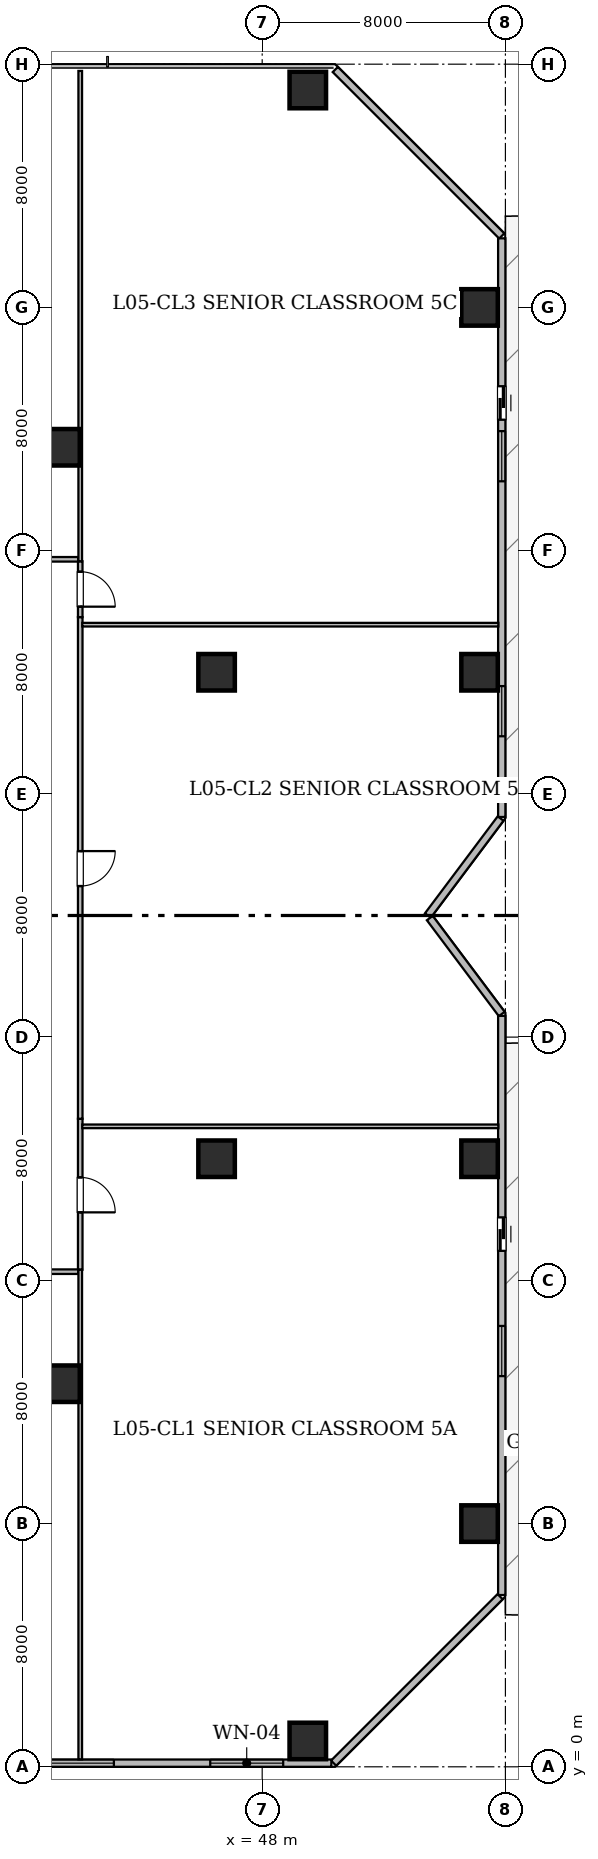
"""IFC4 building model, lengths in metres.
Left out: names, types, materials, properties, quantities, classifications, styles, units other than length and angle.
Written with IfcOpenShell. Run it as: python <this file> out.ifc"""

import sys

from ifc_helpers import new_model, si_unit, direction, frame, frame_2d, origin, origin_2d, place, context, subcontext, project, spatial, rectangle, hollow_rectangle, extrude, element, fill, save


model = new_model("IFC4")
c1 = context("Model", 3, precision=1e-05, world=origin(), true_north=direction((0.0, 1.0)))
c2 = subcontext(c1, "Body", "Model", "MODEL_VIEW")
j1 = project(units=[si_unit("LENGTHUNIT", "METRE"), si_unit("PLANEANGLEUNIT", "RADIAN")], contexts=[c1])
p1 = place(None, origin())
s1 = spatial("IfcSite", under=j1, at=p1, CompositionType="ELEMENT")
p2 = place(p1, origin())
s2 = spatial("IfcBuilding", under=s1, at=p2, CompositionType="ELEMENT")
p3 = place(p2, frame((0.0, 0.0, 24.6)))
s3 = spatial("IfcBuildingStorey", under=s2, at=p3, CompositionType="ELEMENT", Elevation=24.6)
for number, where, z_axis, x_axis in (
    (1, (49.5, 0.85, 0.0), (0.0, 0.0, 1.0), (1.0, 0.0, 0.0)),
    (2, (49.5, 55.15, 0.0), (0.0, 0.0, 1.0), (1.0, 0.0, 0.0)),
    (3, (55.15, 8.0, 0.0), (0.0, 0.0, 1.0), (1.0, 0.0, 0.0)),
    (4, (55.15, 20.0, 0.0), (0.0, 0.0, 1.0), (1.0, 0.0, 0.0)),
    (5, (55.15, 36.0, 0.0), (0.0, 0.0, 1.0), (1.0, 0.0, 0.0)),
    (6, (55.15, 48.0, 0.0), (0.0, 0.0, 1.0), (1.0, 0.0, 0.0)),
    (7, (41.4, 12.6, 0.0), (0.0, 0.0, 1.0), (1.0, 0.0, 0.0)),
    (8, (41.4, 43.4, 0.0), (0.0, 0.0, 1.0), (1.0, 0.0, 0.0)),
    (9, (46.5, 20.0, 0.0), (0.0, 0.0, 1.0), (1.0, 0.0, 0.0)),
    (10, (46.5, 36.0, 0.0), (0.0, 0.0, 1.0), (1.0, 0.0, 0.0)),
):
    element("IfcColumn", number, at=place(p3, frame(where, z_axis=z_axis, x_axis=x_axis)), inside=s3, PredefinedType="COLUMN", context=c2, shape_type="SweptSolid", body=[
        extrude(hollow_rectangle(XDim=1.2, YDim=1.2, WallThickness=0.06, at=origin_2d()), origin(), (0.0, 0.0, 1.0), 4.2),
    ])
p4 = place(p3, frame((50.405, 55.825, 0.0), z_axis=(0.0, 0.0, 1.0), x_axis=(0.707106781187, -0.707106781187, 0.0)))
e11 = element("IfcWall", 11, at=p4, inside=s3, PredefinedType="STANDARD", context=c2, shape_type="SweptSolid", body=[
    extrude(rectangle(XDim=7.743, YDim=0.24, at=frame_2d((3.871, 0.0))), origin(), (0.0, 0.0, 1.0), 3.92),
])
p5 = place(p3, frame((55.88, 50.272, 0.0), z_axis=(0.0, 0.0, 1.0), x_axis=(0.0, -1.0, 0.0)))
e12 = element("IfcWall", 12, at=p5, inside=s3, PredefinedType="STANDARD", context=c2, shape_type="SweptSolid", body=[
    extrude(rectangle(XDim=19.032, YDim=0.24, at=frame_2d((9.516, 0.0))), origin(), (0.0, 0.0, 1.0), 3.92),
])
p6 = place(p5, frame((4.865, 0.0, 0.0)))
e13 = element("IfcOpeningElement", 13, at=p6, cuts=e12, PredefinedType="OPENING", context=c2, shape_type="SweptSolid", body=[
    extrude(rectangle(XDim=1.1, YDim=2.2, at=frame_2d((0.55, 1.1))), frame((0.0, 0.13, 0.0), z_axis=(0.0, -1.0, 0.0), x_axis=(1.0, 0.0, 0.0)), (0.0, 0.0, 1.0), 0.26),
])
p7 = place(p5, frame((14.727, 0.0, 0.85)))
e14 = element("IfcOpeningElement", 14, at=p7, cuts=e12, PredefinedType="OPENING", context=c2, shape_type="SweptSolid", body=[
    extrude(rectangle(XDim=1.65, YDim=1.55, at=frame_2d((0.825, 0.775))), frame((0.0, 0.13, 0.0), z_axis=(0.0, -1.0, 0.0), x_axis=(1.0, 0.0, 0.0)), (0.0, 0.0, 1.0), 0.26),
])
p8 = place(p5, frame((6.341, 0.0, 0.85)))
e15 = element("IfcOpeningElement", 15, at=p8, cuts=e12, PredefinedType="OPENING", context=c2, shape_type="SweptSolid", body=[
    extrude(rectangle(XDim=1.65, YDim=1.55, at=frame_2d((0.825, 0.775))), frame((0.0, 0.13, 0.0), z_axis=(0.0, -1.0, 0.0), x_axis=(1.0, 0.0, 0.0)), (0.0, 0.0, 1.0), 0.26),
])
p9 = place(p3, frame((55.842, 31.189, 0.0), z_axis=(0.0, 0.0, 1.0), x_axis=(-0.600058791648, -0.799955902889, 0.0)))
e16 = element("IfcWall", 16, at=p9, inside=s3, PredefinedType="STANDARD", context=c2, shape_type="SweptSolid", body=[
    extrude(rectangle(XDim=3.986, YDim=0.24, at=frame_2d((1.993, 0.0))), origin(), (0.0, 0.0, 1.0), 3.92),
])
p10 = place(p3, frame((53.513, 27.916, 0.0), z_axis=(0.0, 0.0, 1.0), x_axis=(0.599990098106, -0.800007426325, 0.0)))
e17 = element("IfcWall", 17, at=p10, inside=s3, PredefinedType="STANDARD", context=c2, shape_type="SweptSolid", body=[
    extrude(rectangle(XDim=3.945, YDim=0.24, at=frame_2d((1.973, 0.0))), origin(), (0.0, 0.0, 1.0), 3.92),
])
p11 = place(p3, frame((55.88, 24.698, 0.0), z_axis=(0.0, 0.0, 1.0), x_axis=(0.0, -1.0, 0.0)))
e18 = element("IfcWall", 18, at=p11, inside=s3, PredefinedType="STANDARD", context=c2, shape_type="SweptSolid", body=[
    extrude(rectangle(XDim=19.048, YDim=0.24, at=frame_2d((9.524, 0.0))), origin(), (0.0, 0.0, 1.0), 3.92),
])
p12 = place(p11, frame((6.628, 0.0, 0.0)))
e19 = element("IfcOpeningElement", 19, at=p12, cuts=e18, PredefinedType="OPENING", context=c2, shape_type="SweptSolid", body=[
    extrude(rectangle(XDim=1.1, YDim=2.2, at=frame_2d((0.55, 1.1))), frame((0.0, 0.13, 0.0), z_axis=(0.0, -1.0, 0.0), x_axis=(1.0, 0.0, 0.0)), (0.0, 0.0, 1.0), 0.26),
])
p13 = place(p11, frame((10.198, 0.0, 0.85)))
e20 = element("IfcOpeningElement", 20, at=p13, cuts=e18, PredefinedType="OPENING", context=c2, shape_type="SweptSolid", body=[
    extrude(rectangle(XDim=1.65, YDim=1.55, at=frame_2d((0.825, 0.775))), frame((0.0, 0.13, 0.0), z_axis=(0.0, -1.0, 0.0), x_axis=(1.0, 0.0, 0.0)), (0.0, 0.0, 1.0), 0.26),
])
p14 = place(p3, frame((55.826, 5.596, 0.0), z_axis=(0.0, 0.0, 1.0), x_axis=(-0.707106781187, -0.707106781187, 0.0)))
e21 = element("IfcWall", 21, at=p14, inside=s3, PredefinedType="STANDARD", context=c2, shape_type="SweptSolid", body=[
    extrude(rectangle(XDim=7.744, YDim=0.24, at=frame_2d((3.872, 0.0))), origin(), (0.0, 0.0, 1.0), 3.92),
])
p15 = place(p3, frame((50.275, 0.12, 0.0), z_axis=(0.0, 0.0, 1.0), x_axis=(-1.0, 0.0, 0.0)))
e22 = element("IfcWall", 22, at=p15, inside=s3, PredefinedType="STANDARD", context=c2, shape_type="SweptSolid", body=[
    extrude(rectangle(XDim=44.55, YDim=0.24, at=frame_2d((22.275, 0.0))), origin(), (0.0, 0.0, 1.0), 3.92),
])
p16 = place(p15, frame((1.584, 0.0, 0.9)))
e23 = element("IfcOpeningElement", 23, at=p16, cuts=e22, PredefinedType="OPENING", context=c2, shape_type="SweptSolid", body=[
    extrude(rectangle(XDim=2.4, YDim=1.7, at=frame_2d((1.2, 0.85))), frame((0.0, 0.13, 0.0), z_axis=(0.0, -1.0, 0.0), x_axis=(1.0, 0.0, 0.0)), (0.0, 0.0, 1.0), 0.26),
])
p17 = place(p15, frame((7.153, 0.0, 0.9)))
e24 = element("IfcOpeningElement", 24, at=p17, cuts=e22, PredefinedType="OPENING", context=c2, shape_type="SweptSolid", body=[
    extrude(rectangle(XDim=2.4, YDim=1.7, at=frame_2d((1.2, 0.85))), frame((0.0, 0.13, 0.0), z_axis=(0.0, -1.0, 0.0), x_axis=(1.0, 0.0, 0.0)), (0.0, 0.0, 1.0), 0.26),
])
p18 = place(p15, frame((12.722, 0.0, 0.9)))
e25 = element("IfcOpeningElement", 25, at=p18, cuts=e22, PredefinedType="OPENING", context=c2, shape_type="SweptSolid", body=[
    extrude(rectangle(XDim=2.4, YDim=1.7, at=frame_2d((1.2, 0.85))), frame((0.0, 0.13, 0.0), z_axis=(0.0, -1.0, 0.0), x_axis=(1.0, 0.0, 0.0)), (0.0, 0.0, 1.0), 0.26),
])
p19 = place(p15, frame((18.291, 0.0, 0.9)))
e26 = element("IfcOpeningElement", 26, at=p19, cuts=e22, PredefinedType="OPENING", context=c2, shape_type="SweptSolid", body=[
    extrude(rectangle(XDim=2.4, YDim=1.7, at=frame_2d((1.2, 0.85))), frame((0.0, 0.13, 0.0), z_axis=(0.0, -1.0, 0.0), x_axis=(1.0, 0.0, 0.0)), (0.0, 0.0, 1.0), 0.26),
])
p20 = place(p15, frame((23.859, 0.0, 0.9)))
e27 = element("IfcOpeningElement", 27, at=p20, cuts=e22, PredefinedType="OPENING", context=c2, shape_type="SweptSolid", body=[
    extrude(rectangle(XDim=2.4, YDim=1.7, at=frame_2d((1.2, 0.85))), frame((0.0, 0.13, 0.0), z_axis=(0.0, -1.0, 0.0), x_axis=(1.0, 0.0, 0.0)), (0.0, 0.0, 1.0), 0.26),
])
p21 = place(p15, frame((29.428, 0.0, 0.9)))
e28 = element("IfcOpeningElement", 28, at=p21, cuts=e22, PredefinedType="OPENING", context=c2, shape_type="SweptSolid", body=[
    extrude(rectangle(XDim=2.4, YDim=1.7, at=frame_2d((1.2, 0.85))), frame((0.0, 0.13, 0.0), z_axis=(0.0, -1.0, 0.0), x_axis=(1.0, 0.0, 0.0)), (0.0, 0.0, 1.0), 0.26),
])
p22 = place(p15, frame((34.997, 0.0, 0.9)))
e29 = element("IfcOpeningElement", 29, at=p22, cuts=e22, PredefinedType="OPENING", context=c2, shape_type="SweptSolid", body=[
    extrude(rectangle(XDim=2.4, YDim=1.7, at=frame_2d((1.2, 0.85))), frame((0.0, 0.13, 0.0), z_axis=(0.0, -1.0, 0.0), x_axis=(1.0, 0.0, 0.0)), (0.0, 0.0, 1.0), 0.26),
])
p23 = place(p15, frame((40.566, 0.0, 0.9)))
e30 = element("IfcOpeningElement", 30, at=p23, cuts=e22, PredefinedType="OPENING", context=c2, shape_type="SweptSolid", body=[
    extrude(rectangle(XDim=2.4, YDim=1.7, at=frame_2d((1.2, 0.85))), frame((0.0, 0.13, 0.0), z_axis=(0.0, -1.0, 0.0), x_axis=(1.0, 0.0, 0.0)), (0.0, 0.0, 1.0), 0.26),
])
p24 = place(p3, frame((42.015, 21.314, 0.0), z_axis=(0.0, 0.0, 1.0), x_axis=(0.0, -1.0, 0.0)))
e31 = element("IfcWall", 31, at=p24, inside=s3, PredefinedType="STANDARD", context=c2, shape_type="SweptSolid", body=[
    extrude(rectangle(XDim=4.964, YDim=0.15, at=frame_2d((2.482, 0.0))), origin(), (0.0, 0.0, 1.0), 3.055),
])
p25 = place(p24, frame((1.928, 0.0, 0.0)))
e32 = element("IfcOpeningElement", 32, at=p25, cuts=e31, PredefinedType="OPENING", context=c2, shape_type="SweptSolid", body=[
    extrude(rectangle(XDim=1.15, YDim=2.2, at=frame_2d((0.575, 1.1))), frame((0.0, 0.085, 0.0), z_axis=(0.0, -1.0, 0.0), x_axis=(1.0, 0.0, 0.0)), (0.0, 0.0, 1.0), 0.17),
])
p26 = place(p3, frame((42.015, 37.814, 0.0), z_axis=(0.0, 0.0, 1.0), x_axis=(0.0, -1.0, 0.0)))
e33 = element("IfcWall", 33, at=p26, inside=s3, PredefinedType="STANDARD", context=c2, shape_type="SweptSolid", body=[
    extrude(rectangle(XDim=16.5, YDim=0.15, at=frame_2d((8.25, 0.0))), origin(), (0.0, 0.0, 1.0), 3.055),
])
p27 = place(p26, frame((7.696, 0.0, 0.0)))
e34 = element("IfcOpeningElement", 34, at=p27, cuts=e33, PredefinedType="OPENING", context=c2, shape_type="SweptSolid", body=[
    extrude(rectangle(XDim=1.15, YDim=2.2, at=frame_2d((0.575, 1.1))), frame((0.0, 0.085, 0.0), z_axis=(0.0, -1.0, 0.0), x_axis=(1.0, 0.0, 0.0)), (0.0, 0.0, 1.0), 0.17),
])
p28 = place(p3, frame((42.015, 39.65, 0.0), z_axis=(0.0, 0.0, 1.0), x_axis=(0.0, -1.0, 0.0)))
e35 = element("IfcWall", 35, at=p28, inside=s3, PredefinedType="STANDARD", context=c2, shape_type="SweptSolid", body=[
    extrude(rectangle(XDim=1.836, YDim=0.15, at=frame_2d((0.918, 0.0))), origin(), (0.0, 0.0, 1.0), 3.503),
])
p29 = place(p28, frame((0.343, 0.0, 0.0)))
e36 = element("IfcOpeningElement", 36, at=p29, cuts=e35, PredefinedType="OPENING", context=c2, shape_type="SweptSolid", body=[
    extrude(rectangle(XDim=1.15, YDim=2.2, at=frame_2d((0.575, 1.1))), frame((0.0, 0.085, 0.0), z_axis=(0.0, -1.0, 0.0), x_axis=(1.0, 0.0, 0.0)), (0.0, 0.0, 1.0), 0.17),
])
p30 = place(p3, frame((41.95, 16.285, 0.0), z_axis=(0.0, 0.0, 1.0), x_axis=(-1.0, 0.0, 0.0)))
e37 = element("IfcWall", 37, at=p30, inside=s3, PredefinedType="STANDARD", context=c2, shape_type="SweptSolid", body=[
    extrude(rectangle(XDim=15.7, YDim=0.15, at=frame_2d((7.85, 0.0))), origin(), (0.0, 0.0, 1.0), 3.055),
])
p31 = place(p30, frame((7.4, 0.0, 0.0)))
e38 = element("IfcOpeningElement", 38, at=p31, cuts=e37, PredefinedType="OPENING", context=c2, shape_type="SweptSolid", body=[
    extrude(rectangle(XDim=0.9, YDim=2.1, at=frame_2d((0.45, 1.05))), frame((0.0, 0.085, 0.0), z_axis=(0.0, -1.0, 0.0), x_axis=(1.0, 0.0, 0.0)), (0.0, 0.0, 1.0), 0.17),
])
p32 = place(p3, frame((28.852, 39.715, 0.0), z_axis=(0.0, 0.0, 1.0), x_axis=(1.0, 0.0, 0.0)))
e39 = element("IfcWall", 39, at=p32, inside=s3, PredefinedType="STANDARD", context=c2, shape_type="SweptSolid", body=[
    extrude(rectangle(XDim=13.098, YDim=0.15, at=frame_2d((6.549, 0.0))), origin(), (0.0, 0.0, 1.0), 3.055),
])
p33 = place(p32, frame((5.974, 0.0, 0.0)))
e40 = element("IfcOpeningElement", 40, at=p33, cuts=e39, PredefinedType="OPENING", context=c2, shape_type="SweptSolid", body=[
    extrude(rectangle(XDim=1.15, YDim=2.2, at=frame_2d((0.575, 1.1))), frame((0.0, 0.085, 0.0), z_axis=(0.0, -1.0, 0.0), x_axis=(1.0, 0.0, 0.0)), (0.0, 0.0, 1.0), 0.17),
])
p34 = place(p3, frame((42.082, 21.065, 0.0), z_axis=(0.0, 0.0, 1.0), x_axis=(1.0, 0.0, 0.0)))
e41 = element("IfcWall", 41, at=p34, inside=s3, PredefinedType="PARTITIONING", context=c2, shape_type="SweptSolid", body=[
    extrude(rectangle(XDim=13.686, YDim=0.12, at=frame_2d((6.843, 0.0))), origin(), (0.0, 0.0, 1.0), 3.055),
])
p35 = place(p3, frame((42.015, 0.243, 0.0), z_axis=(0.0, 0.0, 1.0), x_axis=(0.0, 1.0, 0.0)))
e42 = element("IfcWall", 42, at=p35, inside=s3, PredefinedType="PARTITIONING", context=c2, shape_type="SweptSolid", body=[
    extrude(rectangle(XDim=16.107, YDim=0.12, at=frame_2d((8.054, 0.0))), origin(), (0.0, 0.0, 1.0), 3.055),
])
p36 = place(p3, frame((42.082, 37.565, 0.0), z_axis=(0.0, 0.0, 1.0), x_axis=(1.0, 0.0, 0.0)))
e43 = element("IfcWall", 43, at=p36, inside=s3, PredefinedType="PARTITIONING", context=c2, shape_type="SweptSolid", body=[
    extrude(rectangle(XDim=13.686, YDim=0.12, at=frame_2d((6.843, 0.0))), origin(), (0.0, 0.0, 1.0), 3.055),
])
p37 = place(p3, frame((42.015, 39.65, 0.0), z_axis=(0.0, 0.0, 1.0), x_axis=(0.0, 1.0, 0.0)))
e44 = element("IfcWall", 44, at=p37, inside=s3, PredefinedType="PARTITIONING", context=c2, shape_type="SweptSolid", body=[
    extrude(rectangle(XDim=16.128, YDim=0.12, at=frame_2d((8.064, 0.0))), origin(), (0.0, 0.0, 1.0), 3.055),
])
p38 = place(p6, origin())
e45 = element("IfcDoor", 45, at=p38, inside=s3, OperationType="SLIDING_TO_LEFT", PredefinedType="DOOR", context=c2, shape_type="SweptSolid", body=[
    extrude(rectangle(XDim=1.1, YDim=2.2, at=frame_2d((0.55, 1.1))), frame((0.0, 0.025, 0.0), z_axis=(0.0, -1.0, 0.0), x_axis=(1.0, 0.0, 0.0)), (0.0, 0.0, 1.0), 0.05),
])
fill(e13, e45)
p39 = place(p12, origin())
e46 = element("IfcDoor", 46, at=p39, inside=s3, OperationType="SLIDING_TO_LEFT", PredefinedType="DOOR", context=c2, shape_type="SweptSolid", body=[
    extrude(rectangle(XDim=1.1, YDim=2.2, at=frame_2d((0.55, 1.1))), frame((0.0, 0.025, 0.0), z_axis=(0.0, -1.0, 0.0), x_axis=(1.0, 0.0, 0.0)), (0.0, 0.0, 1.0), 0.05),
])
fill(e19, e46)
p40 = place(p13, origin())
e47 = element("IfcWindow", 47, at=p40, inside=s3, PartitioningType="SINGLE_PANEL", PredefinedType="WINDOW", context=c2, shape_type="SweptSolid", body=[
    extrude(rectangle(XDim=1.65, YDim=1.55, at=frame_2d((0.825, 0.775))), frame((0.0, 0.03, 0.0), z_axis=(0.0, -1.0, 0.0), x_axis=(1.0, 0.0, 0.0)), (0.0, 0.0, 1.0), 0.06),
])
fill(e20, e47)
p41 = place(p7, origin())
e48 = element("IfcWindow", 48, at=p41, inside=s3, PartitioningType="SINGLE_PANEL", PredefinedType="WINDOW", context=c2, shape_type="SweptSolid", body=[
    extrude(rectangle(XDim=1.65, YDim=1.55, at=frame_2d((0.825, 0.775))), frame((0.0, 0.03, 0.0), z_axis=(0.0, -1.0, 0.0), x_axis=(1.0, 0.0, 0.0)), (0.0, 0.0, 1.0), 0.06),
])
fill(e14, e48)
p42 = place(p8, origin())
e49 = element("IfcWindow", 49, at=p42, inside=s3, PartitioningType="SINGLE_PANEL", PredefinedType="WINDOW", context=c2, shape_type="SweptSolid", body=[
    extrude(rectangle(XDim=1.65, YDim=1.55, at=frame_2d((0.825, 0.775))), frame((0.0, 0.03, 0.0), z_axis=(0.0, -1.0, 0.0), x_axis=(1.0, 0.0, 0.0)), (0.0, 0.0, 1.0), 0.06),
])
fill(e15, e49)
p43 = place(p16, origin())
e50 = element("IfcWindow", 50, at=p43, inside=s3, PartitioningType="SINGLE_PANEL", PredefinedType="WINDOW", context=c2, shape_type="SweptSolid", body=[
    extrude(rectangle(XDim=2.4, YDim=1.7, at=frame_2d((1.2, 0.85))), frame((0.0, 0.03, 0.0), z_axis=(0.0, -1.0, 0.0), x_axis=(1.0, 0.0, 0.0)), (0.0, 0.0, 1.0), 0.06),
])
fill(e23, e50)
p44 = place(p17, origin())
e51 = element("IfcWindow", 51, at=p44, inside=s3, PartitioningType="SINGLE_PANEL", PredefinedType="WINDOW", context=c2, shape_type="SweptSolid", body=[
    extrude(rectangle(XDim=2.4, YDim=1.7, at=frame_2d((1.2, 0.85))), frame((0.0, 0.03, 0.0), z_axis=(0.0, -1.0, 0.0), x_axis=(1.0, 0.0, 0.0)), (0.0, 0.0, 1.0), 0.06),
])
fill(e24, e51)
p45 = place(p25, origin())
e52 = element("IfcDoor", 52, at=p45, inside=s3, OperationType="SINGLE_SWING_RIGHT", PredefinedType="DOOR", context=c2, shape_type="SweptSolid", body=[
    extrude(rectangle(XDim=1.15, YDim=2.2, at=frame_2d((0.575, 1.1))), frame((0.0, 0.025, 0.0), z_axis=(0.0, -1.0, 0.0), x_axis=(1.0, 0.0, 0.0)), (0.0, 0.0, 1.0), 0.05),
])
fill(e32, e52)
p46 = place(p27, origin())
e53 = element("IfcDoor", 53, at=p46, inside=s3, OperationType="SINGLE_SWING_LEFT", PredefinedType="DOOR", context=c2, shape_type="SweptSolid", body=[
    extrude(rectangle(XDim=1.15, YDim=2.2, at=frame_2d((0.575, 1.1))), frame((0.0, 0.025, 0.0), z_axis=(0.0, -1.0, 0.0), x_axis=(1.0, 0.0, 0.0)), (0.0, 0.0, 1.0), 0.05),
])
fill(e34, e53)
p47 = place(p29, origin())
e54 = element("IfcDoor", 54, at=p47, inside=s3, OperationType="SINGLE_SWING_RIGHT", PredefinedType="DOOR", context=c2, shape_type="SweptSolid", body=[
    extrude(rectangle(XDim=1.15, YDim=2.2, at=frame_2d((0.575, 1.1))), frame((0.0, 0.025, 0.0), z_axis=(0.0, -1.0, 0.0), x_axis=(1.0, 0.0, 0.0)), (0.0, 0.0, 1.0), 0.05),
])
fill(e36, e54)
save(model, sys.argv[1])
